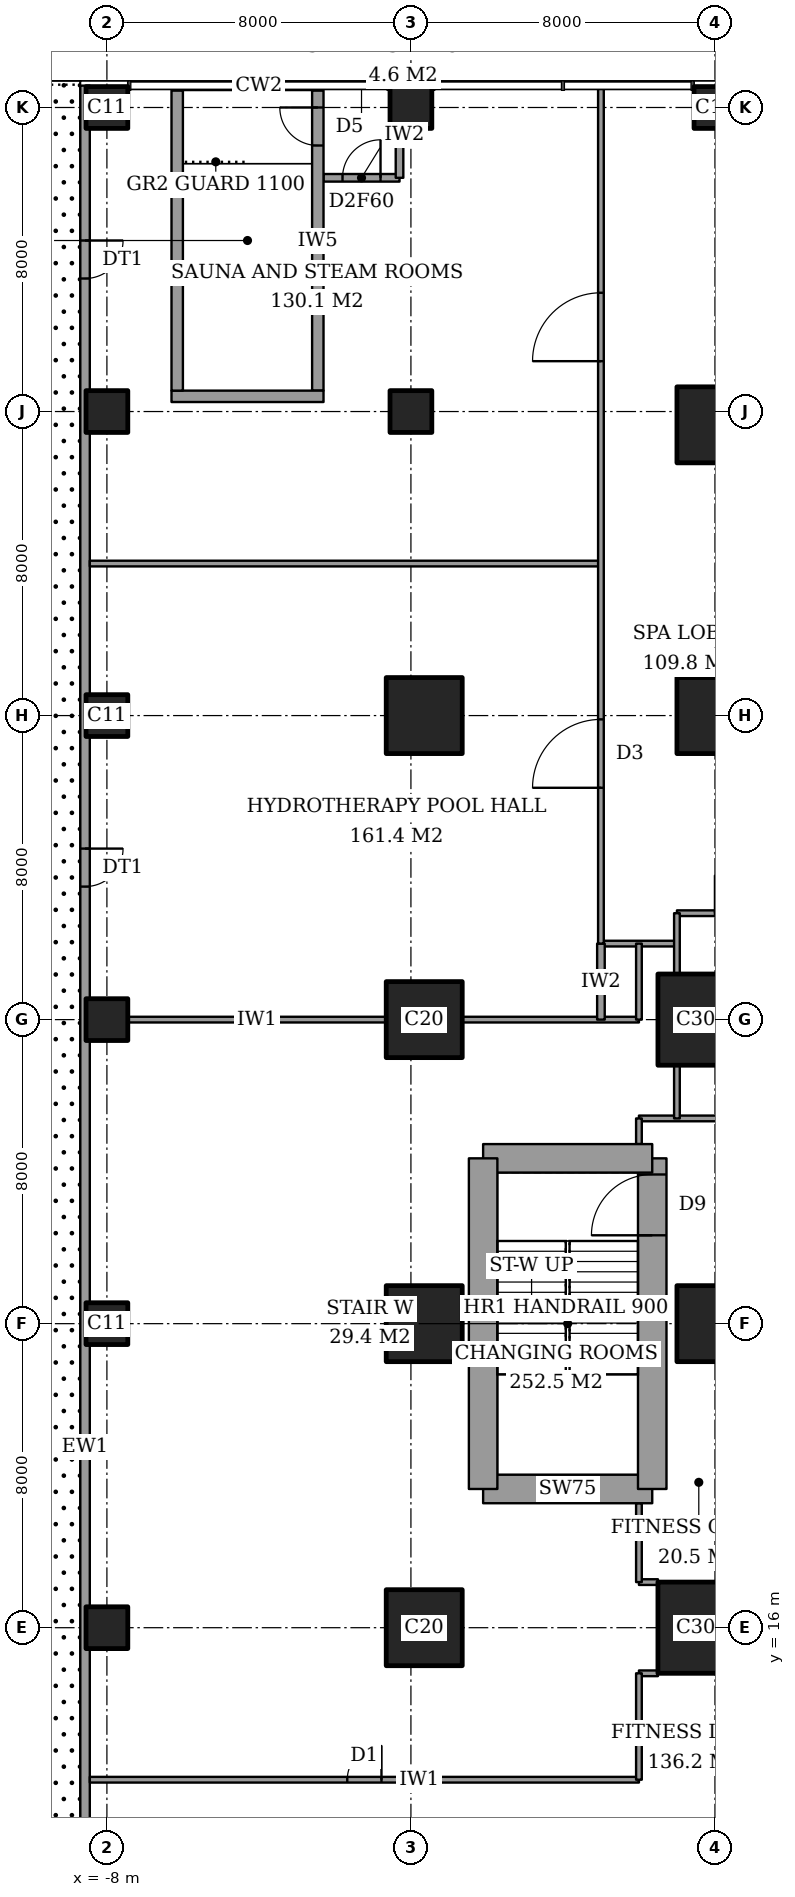
"""IFC4 building model, lengths in metres.
Left out: names, types, materials, properties, quantities, classifications, styles, units other than length and angle.
Written with IfcOpenShell. Run it as: python <this file> out.ifc"""

import sys

from ifc_helpers import new_model, si_unit, direction, frame, frame_2d, origin, origin_2d, place, context, subcontext, project, spatial, rectangle, extrude, element, fill, save


model = new_model("IFC4")
c1 = context("Model", 3, precision=1e-05, world=origin(), true_north=direction((0.0, 1.0)))
c2 = subcontext(c1, "Body", "Model", "MODEL_VIEW")
j1 = project(units=[si_unit("LENGTHUNIT", "METRE"), si_unit("PLANEANGLEUNIT", "RADIAN")], contexts=[c1])
p1 = place(None, origin())
s1 = spatial("IfcSite", under=j1, at=p1, CompositionType="ELEMENT")
p2 = place(p1, origin())
s2 = spatial("IfcBuilding", under=s1, at=p2, CompositionType="ELEMENT")
p3 = place(p2, frame((0.0, 0.0, 11.0)))
s3 = spatial("IfcBuildingStorey", under=s2, at=p3, CompositionType="ELEMENT", Elevation=11.0)
for number, where, z_axis, x_axis in (
    (1, (-8.0, 16.0, 0.0), (0.0, 0.0, 1.0), (1.0, 0.0, 0.0)),
    (2, (-8.0, 24.0, 0.0), (0.0, 0.0, 1.0), (1.0, 0.0, 0.0)),
    (3, (-8.0, 32.0, 0.0), (0.0, 0.0, 1.0), (1.0, 0.0, 0.0)),
    (4, (-8.0, 40.0, 0.0), (0.0, 0.0, 1.0), (1.0, 0.0, 0.0)),
    (5, (-8.0, 48.0, 0.0), (0.0, 0.0, 1.0), (1.0, 0.0, 0.0)),
    (6, (-8.0, 56.0, 0.0), (0.0, 0.0, 1.0), (1.0, 0.0, 0.0)),
):
    element("IfcColumn", number, at=place(p3, frame(where, z_axis=z_axis, x_axis=x_axis)), inside=s3, PredefinedType="COLUMN", context=c2, shape_type="SweptSolid", body=[
        extrude(rectangle(XDim=1.1, YDim=1.1, at=origin_2d()), origin(), (0.0, 0.0, 1.0), 5.0),
    ])
for number, where, z_axis, x_axis in (
    (7, (0.35, 16.0, 0.0), (0.0, 0.0, 1.0), (1.0, 0.0, 0.0)),
    (8, (0.35, 24.0, 0.0), (0.0, 0.0, 1.0), (1.0, 0.0, 0.0)),
    (9, (0.35, 32.0, 0.0), (0.0, 0.0, 1.0), (1.0, 0.0, 0.0)),
    (10, (0.35, 40.0, 0.0), (0.0, 0.0, 1.0), (1.0, 0.0, 0.0)),
):
    element("IfcColumn", number, at=place(p3, frame(where, z_axis=z_axis, x_axis=x_axis)), inside=s3, PredefinedType="COLUMN", context=c2, shape_type="SweptSolid", body=[
        extrude(rectangle(XDim=2.0, YDim=2.0, at=origin_2d()), origin(), (0.0, 0.0, 1.0), 5.0),
    ])
for number, where, z_axis, x_axis in (
    (11, (0.0, 48.0, 0.0), (0.0, 0.0, 1.0), (1.0, 0.0, 0.0)),
    (12, (0.0, 56.0, 0.0), (0.0, 0.0, 1.0), (1.0, 0.0, 0.0)),
):
    element("IfcColumn", number, at=place(p3, frame(where, z_axis=z_axis, x_axis=x_axis)), inside=s3, PredefinedType="COLUMN", context=c2, shape_type="SweptSolid", body=[
        extrude(rectangle(XDim=1.1, YDim=1.1, at=origin_2d()), origin(), (0.0, 0.0, 1.0), 5.0),
    ])
p4 = place(p3, frame((8.0, 16.0, 0.0), z_axis=(0.0, 0.0, 1.0), x_axis=(1.0, 0.0, 0.0)))
e13 = element("IfcColumn", 13, at=p4, inside=s3, PredefinedType="COLUMN", context=c2, shape_type="SweptSolid", body=[
    extrude(rectangle(XDim=3.0, YDim=2.4, at=origin_2d()), origin(), (0.0, 0.0, 1.0), 5.0),
])
p5 = place(p3, frame((8.0, 24.0, 0.0), z_axis=(0.0, 0.0, 1.0), x_axis=(1.0, 0.0, 0.0)))
e14 = element("IfcColumn", 14, at=p5, inside=s3, PredefinedType="COLUMN", context=c2, shape_type="SweptSolid", body=[
    extrude(rectangle(XDim=2.0, YDim=2.0, at=origin_2d()), origin(), (0.0, 0.0, 1.0), 5.0),
])
p6 = place(p3, frame((8.0, 32.0, 0.0), z_axis=(0.0, 0.0, 1.0), x_axis=(1.0, 0.0, 0.0)))
e15 = element("IfcColumn", 15, at=p6, inside=s3, PredefinedType="COLUMN", context=c2, shape_type="SweptSolid", body=[
    extrude(rectangle(XDim=3.0, YDim=2.4, at=origin_2d()), origin(), (0.0, 0.0, 1.0), 5.0),
])
for number, where, z_axis, x_axis in (
    (16, (8.0, 40.0, 0.0), (0.0, 0.0, 1.0), (1.0, 0.0, 0.0)),
    (17, (8.0, 47.65, 0.0), (0.0, 0.0, 1.0), (1.0, 0.0, 0.0)),
):
    element("IfcColumn", number, at=place(p3, frame(where, z_axis=z_axis, x_axis=x_axis)), inside=s3, PredefinedType="COLUMN", context=c2, shape_type="SweptSolid", body=[
        extrude(rectangle(XDim=2.0, YDim=2.0, at=origin_2d()), origin(), (0.0, 0.0, 1.0), 5.0),
    ])
p7 = place(p3, frame((8.0, 56.0, 0.0), z_axis=(0.0, 0.0, 1.0), x_axis=(1.0, 0.0, 0.0)))
e18 = element("IfcColumn", 18, at=p7, inside=s3, PredefinedType="COLUMN", context=c2, shape_type="SweptSolid", body=[
    extrude(rectangle(XDim=1.1, YDim=1.1, at=origin_2d()), origin(), (0.0, 0.0, 1.0), 5.0),
])
p8 = place(p3, frame((1.9, 19.65, 0.0), z_axis=(0.0, 0.0, 1.0), x_axis=(1.0, 0.0, 0.0)))
e19 = element("IfcWall", 19, at=p8, inside=s3, PredefinedType="SHEAR", context=c2, shape_type="SweptSolid", body=[
    extrude(rectangle(XDim=4.45, YDim=0.75, at=frame_2d((2.225, 0.0))), origin(), (0.0, 0.0, 1.0), 5.0),
])
p9 = place(p3, frame((6.35, 19.65, 0.0), z_axis=(0.0, 0.0, 1.0), x_axis=(0.0, 1.0, 0.0)))
e20 = element("IfcWall", 20, at=p9, inside=s3, PredefinedType="SHEAR", context=c2, shape_type="SweptSolid", body=[
    extrude(rectangle(XDim=8.7, YDim=0.75, at=frame_2d((4.35, 0.0))), origin(), (0.0, 0.0, 1.0), 5.0),
])
p10 = place(p9, frame((6.675, 0.0, 0.0)))
e21 = element("IfcOpeningElement", 21, at=p10, cuts=e20, PredefinedType="OPENING", context=c2, shape_type="SweptSolid", body=[
    extrude(rectangle(XDim=1.6, YDim=2.1, at=frame_2d((0.8, 1.05))), frame((0.0, 0.385, 0.0), z_axis=(0.0, -1.0, 0.0), x_axis=(1.0, 0.0, 0.0)), (0.0, 0.0, 1.0), 0.77),
])
p11 = place(p3, frame((6.35, 28.35, 0.0), z_axis=(0.0, 0.0, 1.0), x_axis=(-1.0, 0.0, 0.0)))
e22 = element("IfcWall", 22, at=p11, inside=s3, PredefinedType="SHEAR", context=c2, shape_type="SweptSolid", body=[
    extrude(rectangle(XDim=4.45, YDim=0.75, at=frame_2d((2.225, 0.0))), origin(), (0.0, 0.0, 1.0), 5.0),
])
p12 = place(p3, frame((1.9, 28.35, 0.0), z_axis=(0.0, 0.0, 1.0), x_axis=(0.0, -1.0, 0.0)))
e23 = element("IfcWall", 23, at=p12, inside=s3, PredefinedType="SHEAR", context=c2, shape_type="SweptSolid", body=[
    extrude(rectangle(XDim=8.7, YDim=0.75, at=frame_2d((4.35, 0.0))), origin(), (0.0, 0.0, 1.0), 5.0),
])
p13 = place(p3, frame((-8.575, 56.575, 0.0), z_axis=(0.0, 0.0, 1.0), x_axis=(0.0, -1.0, 0.0)))
e24 = element("IfcWall", 24, at=p13, inside=s3, PredefinedType="SOLIDWALL", context=c2, shape_type="SweptSolid", body=[
    extrude(rectangle(XDim=65.15, YDim=0.25, at=frame_2d((32.575, 0.0))), origin(), (0.0, 0.0, 1.0), 5.0),
])
p14 = place(p13, frame((4.075, 0.0, 0.0)))
e25 = element("IfcOpeningElement", 25, at=p14, cuts=e24, PredefinedType="OPENING", context=c2, shape_type="SweptSolid", body=[
    extrude(rectangle(XDim=1.0, YDim=2.4, at=frame_2d((0.5, 1.2))), frame((0.0, 0.135, 0.0), z_axis=(0.0, -1.0, 0.0), x_axis=(1.0, 0.0, 0.0)), (0.0, 0.0, 1.0), 0.27),
])
p15 = place(p13, frame((20.075, 0.0, 0.0)))
e26 = element("IfcOpeningElement", 26, at=p15, cuts=e24, PredefinedType="OPENING", context=c2, shape_type="SweptSolid", body=[
    extrude(rectangle(XDim=1.0, YDim=2.4, at=frame_2d((0.5, 1.2))), frame((0.0, 0.135, 0.0), z_axis=(0.0, -1.0, 0.0), x_axis=(1.0, 0.0, 0.0)), (0.0, 0.0, 1.0), 0.27),
])
p16 = place(p13, frame((52.075, 0.0, 0.0)))
e27 = element("IfcOpeningElement", 27, at=p16, cuts=e24, PredefinedType="OPENING", context=c2, shape_type="SweptSolid", body=[
    extrude(rectangle(XDim=1.0, YDim=2.4, at=frame_2d((0.5, 1.2))), frame((0.0, 0.135, 0.0), z_axis=(0.0, -1.0, 0.0), x_axis=(1.0, 0.0, 0.0)), (0.0, 0.0, 1.0), 0.27),
])
p17 = place(p3, frame((-8.45, 12.0, 0.0), z_axis=(0.0, 0.0, 1.0), x_axis=(1.0, 0.0, 0.0)))
e28 = element("IfcWall", 28, at=p17, inside=s3, PredefinedType="PARTITIONING", context=c2, shape_type="SweptSolid", body=[
    extrude(rectangle(XDim=14.45, YDim=0.15, at=frame_2d((7.225, 0.0))), origin(), (0.0, 0.0, 1.0), 4.7),
])
p18 = place(p17, frame((6.775, 0.0, 0.0)))
e29 = element("IfcOpeningElement", 29, at=p18, cuts=e28, PredefinedType="OPENING", context=c2, shape_type="SweptSolid", body=[
    extrude(rectangle(XDim=0.9, YDim=2.1, at=frame_2d((0.45, 1.05))), frame((0.0, 0.085, 0.0), z_axis=(0.0, -1.0, 0.0), x_axis=(1.0, 0.0, 0.0)), (0.0, 0.0, 1.0), 0.17),
])
for number, where, z_axis, x_axis in (
    (30, (6.0, 14.8, 0.0), (0.0, 0.0, 1.0), (1.0, 0.0, 0.0)),
    (31, (6.0, 17.2, 0.0), (0.0, 0.0, 1.0), (1.0, 0.0, 0.0)),
):
    element("IfcWall", number, at=place(p3, frame(where, z_axis=z_axis, x_axis=x_axis)), inside=s3, PredefinedType="PARTITIONING", context=c2, shape_type="SweptSolid", body=[
        extrude(rectangle(XDim=0.5, YDim=0.15, at=frame_2d((0.25, 0.0))), origin(), (0.0, 0.0, 1.0), 4.7),
    ])
p19 = place(p3, frame((6.0, 29.4, 0.0), z_axis=(0.0, 0.0, 1.0), x_axis=(1.0, 0.0, 0.0)))
e32 = element("IfcWall", 32, at=p19, inside=s3, PredefinedType="PARTITIONING", context=c2, shape_type="SweptSolid", body=[
    extrude(rectangle(XDim=12.9, YDim=0.15, at=frame_2d((6.45, 0.0))), origin(), (0.0, 0.0, 1.0), 4.7),
])
p20 = place(p19, frame((6.45, 0.0, 0.0)))
e33 = element("IfcOpeningElement", 33, at=p20, cuts=e32, PredefinedType="OPENING", context=c2, shape_type="SweptSolid", body=[
    extrude(rectangle(XDim=1.0, YDim=2.1, at=frame_2d((0.5, 1.05))), frame((0.0, 0.085, 0.0), z_axis=(0.0, -1.0, 0.0), x_axis=(1.0, 0.0, 0.0)), (0.0, 0.0, 1.0), 0.17),
])
p21 = place(p3, frame((-7.45, 32.0, 0.0), z_axis=(0.0, 0.0, 1.0), x_axis=(1.0, 0.0, 0.0)))
e34 = element("IfcWall", 34, at=p21, inside=s3, PredefinedType="PARTITIONING", context=c2, shape_type="SweptSolid", body=[
    extrude(rectangle(XDim=6.8, YDim=0.15, at=frame_2d((3.4, 0.0))), origin(), (0.0, 0.0, 1.0), 3.3),
])
p22 = place(p3, frame((1.35, 32.0, 0.0), z_axis=(0.0, 0.0, 1.0), x_axis=(1.0, 0.0, 0.0)))
e35 = element("IfcWall", 35, at=p22, inside=s3, PredefinedType="PARTITIONING", context=c2, shape_type="SweptSolid", body=[
    extrude(rectangle(XDim=4.65, YDim=0.15, at=frame_2d((2.325, 0.0))), origin(), (0.0, 0.0, 1.0), 3.3),
])
p23 = place(p3, frame((5.0, 34.0, 0.0), z_axis=(0.0, 0.0, 1.0), x_axis=(1.0, 0.0, 0.0)))
e36 = element("IfcWall", 36, at=p23, inside=s3, PredefinedType="PARTITIONING", context=c2, shape_type="SweptSolid", body=[
    extrude(rectangle(XDim=2.0, YDim=0.15, at=frame_2d((1.0, 0.0))), origin(), (0.0, 0.0, 1.0), 4.7),
])
p24 = place(p3, frame((7.0, 34.8, 0.0), z_axis=(0.0, 0.0, 1.0), x_axis=(1.0, 0.0, 0.0)))
e37 = element("IfcWall", 37, at=p24, inside=s3, PredefinedType="PARTITIONING", context=c2, shape_type="SweptSolid", body=[
    extrude(rectangle(XDim=11.9, YDim=0.15, at=frame_2d((5.95, 0.0))), origin(), (0.0, 0.0, 1.0), 4.7),
])
p25 = place(p24, frame((1.0, 0.0, 0.0)))
e38 = element("IfcOpeningElement", 38, at=p25, cuts=e37, PredefinedType="OPENING", context=c2, shape_type="SweptSolid", body=[
    extrude(rectangle(XDim=1.0, YDim=2.1, at=frame_2d((0.5, 1.05))), frame((0.0, 0.085, 0.0), z_axis=(0.0, -1.0, 0.0), x_axis=(1.0, 0.0, 0.0)), (0.0, 0.0, 1.0), 0.17),
])
p26 = place(p3, frame((-8.45, 44.0, 0.0), z_axis=(0.0, 0.0, 1.0), x_axis=(1.0, 0.0, 0.0)))
e39 = element("IfcWall", 39, at=p26, inside=s3, PredefinedType="PARTITIONING", context=c2, shape_type="SweptSolid", body=[
    extrude(rectangle(XDim=13.45, YDim=0.15, at=frame_2d((6.725, 0.0))), origin(), (0.0, 0.0, 1.0), 4.7),
])
p27 = place(p3, frame((-2.3, 54.15, 0.0), z_axis=(0.0, 0.0, 1.0), x_axis=(1.0, 0.0, 0.0)))
e40 = element("IfcWall", 40, at=p27, inside=s3, PredefinedType="PARTITIONING", context=c2, shape_type="SweptSolid", body=[
    extrude(rectangle(XDim=2.0, YDim=0.2, at=frame_2d((1.0, 0.0))), origin(), (0.0, 0.0, 1.0), 4.7),
])
p28 = place(p27, frame((0.5, 0.0, 0.0)))
e41 = element("IfcOpeningElement", 41, at=p28, cuts=e40, PredefinedType="OPENING", context=c2, shape_type="SweptSolid", body=[
    extrude(rectangle(XDim=1.0, YDim=2.1, at=frame_2d((0.5, 1.05))), frame((0.0, 0.11, 0.0), z_axis=(0.0, -1.0, 0.0), x_axis=(1.0, 0.0, 0.0)), (0.0, 0.0, 1.0), 0.22),
])
p29 = place(p3, frame((-0.3, 54.15, 0.0), z_axis=(0.0, 0.0, 1.0), x_axis=(0.0, 1.0, 0.0)))
e42 = element("IfcWall", 42, at=p29, inside=s3, PredefinedType="PARTITIONING", context=c2, shape_type="SweptSolid", body=[
    extrude(rectangle(XDim=1.3, YDim=0.2, at=frame_2d((0.65, 0.0))), origin(), (0.0, 0.0, 1.0), 3.3),
])
p30 = place(p3, frame((5.0, 32.0, 0.0), z_axis=(0.0, 0.0, 1.0), x_axis=(0.0, 1.0, 0.0)))
e43 = element("IfcWall", 43, at=p30, inside=s3, PredefinedType="PARTITIONING", context=c2, shape_type="SweptSolid", body=[
    extrude(rectangle(XDim=2.0, YDim=0.2, at=frame_2d((1.0, 0.0))), origin(), (0.0, 0.0, 1.0), 4.7),
])
p31 = place(p3, frame((5.0, 34.0, 0.0), z_axis=(0.0, 0.0, 1.0), x_axis=(0.0, 1.0, 0.0)))
e44 = element("IfcWall", 44, at=p31, inside=s3, PredefinedType="PARTITIONING", context=c2, shape_type="SweptSolid", body=[
    extrude(rectangle(XDim=22.561, YDim=0.15, at=frame_2d((11.281, 0.0))), origin(), (0.0, 0.0, 1.0), 4.7),
])
p32 = place(p31, frame((4.1, 0.0, 0.0)))
e45 = element("IfcOpeningElement", 45, at=p32, cuts=e44, PredefinedType="OPENING", context=c2, shape_type="SweptSolid", body=[
    extrude(rectangle(XDim=1.8, YDim=2.1, at=frame_2d((0.9, 1.05))), frame((0.0, 0.085, 0.0), z_axis=(0.0, -1.0, 0.0), x_axis=(1.0, 0.0, 0.0)), (0.0, 0.0, 1.0), 0.17),
])
p33 = place(p31, frame((15.325, 0.0, 0.0)))
e46 = element("IfcOpeningElement", 46, at=p33, cuts=e44, PredefinedType="OPENING", context=c2, shape_type="SweptSolid", body=[
    extrude(rectangle(XDim=1.8, YDim=2.1, at=frame_2d((0.9, 1.05))), frame((0.0, 0.085, 0.0), z_axis=(0.0, -1.0, 0.0), x_axis=(1.0, 0.0, 0.0)), (0.0, 0.0, 1.0), 0.17),
])
p34 = place(p3, frame((6.0, 12.0, 0.0), z_axis=(0.0, 0.0, 1.0), x_axis=(0.0, 1.0, 0.0)))
e47 = element("IfcWall", 47, at=p34, inside=s3, PredefinedType="PARTITIONING", context=c2, shape_type="SweptSolid", body=[
    extrude(rectangle(XDim=2.8, YDim=0.15, at=frame_2d((1.4, 0.0))), origin(), (0.0, 0.0, 1.0), 4.7),
])
p35 = place(p3, frame((6.0, 17.2, 0.0), z_axis=(0.0, 0.0, 1.0), x_axis=(0.0, 1.0, 0.0)))
e48 = element("IfcWall", 48, at=p35, inside=s3, PredefinedType="PARTITIONING", context=c2, shape_type="SweptSolid", body=[
    extrude(rectangle(XDim=2.075, YDim=0.15, at=frame_2d((1.038, 0.0))), origin(), (0.0, 0.0, 1.0), 4.7),
])
p36 = place(p3, frame((6.0, 28.725, 0.0), z_axis=(0.0, 0.0, 1.0), x_axis=(0.0, 1.0, 0.0)))
e49 = element("IfcWall", 49, at=p36, inside=s3, PredefinedType="PARTITIONING", context=c2, shape_type="SweptSolid", body=[
    extrude(rectangle(XDim=0.675, YDim=0.15, at=frame_2d((0.337, 0.0))), origin(), (0.0, 0.0, 1.0), 4.7),
])
p37 = place(p3, frame((6.0, 32.0, 0.0), z_axis=(0.0, 0.0, 1.0), x_axis=(0.0, 1.0, 0.0)))
e50 = element("IfcWall", 50, at=p37, inside=s3, PredefinedType="PARTITIONING", context=c2, shape_type="SweptSolid", body=[
    extrude(rectangle(XDim=2.0, YDim=0.15, at=frame_2d((1.0, 0.0))), origin(), (0.0, 0.0, 1.0), 4.7),
])
p38 = place(p3, frame((7.0, 29.4, 0.0), z_axis=(0.0, 0.0, 1.0), x_axis=(0.0, 1.0, 0.0)))
e51 = element("IfcWall", 51, at=p38, inside=s3, PredefinedType="PARTITIONING", context=c2, shape_type="SweptSolid", body=[
    extrude(rectangle(XDim=1.4, YDim=0.15, at=frame_2d((0.7, 0.0))), origin(), (0.0, 0.0, 1.0), 4.7),
])
p39 = place(p3, frame((7.0, 33.2, 0.0), z_axis=(0.0, 0.0, 1.0), x_axis=(0.0, 1.0, 0.0)))
e52 = element("IfcWall", 52, at=p39, inside=s3, PredefinedType="PARTITIONING", context=c2, shape_type="SweptSolid", body=[
    extrude(rectangle(XDim=1.6, YDim=0.15, at=frame_2d((0.8, 0.0))), origin(), (0.0, 0.0, 1.0), 4.7),
])
p40 = place(p3, frame((-6.3, 48.4, 0.0), z_axis=(0.0, 0.0, 1.0), x_axis=(1.0, 0.0, 0.0)))
e53 = element("IfcWall", 53, at=p40, inside=s3, PredefinedType="PARTITIONING", context=c2, shape_type="SweptSolid", body=[
    extrude(rectangle(XDim=4.0, YDim=0.3, at=frame_2d((2.0, 0.0))), origin(), (0.0, 0.0, 1.0), 4.7),
])
p41 = place(p3, frame((-6.15, 48.55, 0.0), z_axis=(0.0, 0.0, 1.0), x_axis=(0.0, 1.0, 0.0)))
e54 = element("IfcWall", 54, at=p41, inside=s3, PredefinedType="PARTITIONING", context=c2, shape_type="SweptSolid", body=[
    extrude(rectangle(XDim=7.9, YDim=0.3, at=frame_2d((3.95, 0.0))), origin(), (0.0, 0.0, 1.0), 4.7),
])
p42 = place(p3, frame((-2.45, 48.55, 0.0), z_axis=(0.0, 0.0, 1.0), x_axis=(0.0, 1.0, 0.0)))
e55 = element("IfcWall", 55, at=p42, inside=s3, PredefinedType="PARTITIONING", context=c2, shape_type="SweptSolid", body=[
    extrude(rectangle(XDim=7.9, YDim=0.3, at=frame_2d((3.95, 0.0))), origin(), (0.0, 0.0, 1.0), 4.7),
])
p43 = place(p42, frame((6.45, 0.0, 0.0)))
e56 = element("IfcOpeningElement", 56, at=p43, cuts=e55, PredefinedType="OPENING", context=c2, shape_type="SweptSolid", body=[
    extrude(rectangle(XDim=1.0, YDim=2.1, at=frame_2d((0.5, 1.05))), frame((0.0, 0.16, 0.0), z_axis=(0.0, -1.0, 0.0), x_axis=(1.0, 0.0, 0.0)), (0.0, 0.0, 1.0), 0.32),
])
for number, where, z_axis, x_axis in (
    (57, (-6.15, 56.45, 0.0), (0.0, 0.0, 1.0), (0.0, 1.0, 0.0)),
    (58, (-2.45, 56.45, 0.0), (0.0, 0.0, 1.0), (0.0, 1.0, 0.0)),
):
    element("IfcWall", number, at=place(p3, frame(where, z_axis=z_axis, x_axis=x_axis)), inside=s3, PredefinedType="PARTITIONING", context=c2, shape_type="SweptSolid", body=[
        extrude(rectangle(XDim=0.111, YDim=0.2, at=frame_2d((0.056, 0.0))), origin(), (0.0, 0.0, 1.0), 4.7),
    ])
p44 = place(p14, origin())
e59 = element("IfcDoor", 59, at=p44, inside=s3, OperationType="SINGLE_SWING_RIGHT", PredefinedType="DOOR", context=c2, shape_type="SweptSolid", body=[
    extrude(rectangle(XDim=1.0, YDim=2.4, at=frame_2d((0.5, 1.2))), frame((0.0, 0.025, 0.0), z_axis=(0.0, -1.0, 0.0), x_axis=(1.0, 0.0, 0.0)), (0.0, 0.0, 1.0), 0.05),
])
fill(e25, e59)
p45 = place(p15, origin())
e60 = element("IfcDoor", 60, at=p45, inside=s3, OperationType="SINGLE_SWING_RIGHT", PredefinedType="DOOR", context=c2, shape_type="SweptSolid", body=[
    extrude(rectangle(XDim=1.0, YDim=2.4, at=frame_2d((0.5, 1.2))), frame((0.0, 0.025, 0.0), z_axis=(0.0, -1.0, 0.0), x_axis=(1.0, 0.0, 0.0)), (0.0, 0.0, 1.0), 0.05),
])
fill(e26, e60)
p46 = place(p18, origin())
e61 = element("IfcDoor", 61, at=p46, inside=s3, OperationType="SINGLE_SWING_LEFT", PredefinedType="DOOR", context=c2, shape_type="SweptSolid", body=[
    extrude(rectangle(XDim=0.9, YDim=2.1, at=frame_2d((0.45, 1.05))), frame((0.0, 0.025, 0.0), z_axis=(0.0, -1.0, 0.0), x_axis=(1.0, 0.0, 0.0)), (0.0, 0.0, 1.0), 0.05),
])
fill(e29, e61)
p47 = place(p32, origin())
e62 = element("IfcDoor", 62, at=p47, inside=s3, OperationType="DOUBLE_DOOR_DOUBLE_SWING", PredefinedType="DOOR", context=c2, shape_type="SweptSolid", body=[
    extrude(rectangle(XDim=1.8, YDim=2.1, at=frame_2d((0.9, 1.05))), frame((0.0, 0.025, 0.0), z_axis=(0.0, -1.0, 0.0), x_axis=(1.0, 0.0, 0.0)), (0.0, 0.0, 1.0), 0.05),
])
fill(e45, e62)
p48 = place(p33, origin())
e63 = element("IfcDoor", 63, at=p48, inside=s3, OperationType="DOUBLE_DOOR_DOUBLE_SWING", PredefinedType="DOOR", context=c2, shape_type="SweptSolid", body=[
    extrude(rectangle(XDim=1.8, YDim=2.1, at=frame_2d((0.9, 1.05))), frame((0.0, 0.025, 0.0), z_axis=(0.0, -1.0, 0.0), x_axis=(1.0, 0.0, 0.0)), (0.0, 0.0, 1.0), 0.05),
])
fill(e46, e63)
p49 = place(p28, origin())
e64 = element("IfcDoor", 64, at=p49, inside=s3, OperationType="SINGLE_SWING_LEFT", PredefinedType="DOOR", context=c2, shape_type="SweptSolid", body=[
    extrude(rectangle(XDim=1.0, YDim=2.1, at=frame_2d((0.5, 1.05))), frame((0.0, 0.025, 0.0), z_axis=(0.0, -1.0, 0.0), x_axis=(1.0, 0.0, 0.0)), (0.0, 0.0, 1.0), 0.05),
])
fill(e41, e64)
p50 = place(p43, origin())
e65 = element("IfcDoor", 65, at=p50, inside=s3, OperationType="SINGLE_SWING_LEFT", PredefinedType="DOOR", context=c2, shape_type="SweptSolid", body=[
    extrude(rectangle(XDim=1.0, YDim=2.1, at=frame_2d((0.5, 1.05))), frame((0.0, 0.025, 0.0), z_axis=(0.0, -1.0, 0.0), x_axis=(1.0, 0.0, 0.0)), (0.0, 0.0, 1.0), 0.05),
])
fill(e56, e65)
p51 = place(p10, origin())
e66 = element("IfcDoor", 66, at=p51, inside=s3, OperationType="DOUBLE_DOOR_SINGLE_SWING", PredefinedType="DOOR", context=c2, shape_type="SweptSolid", body=[
    extrude(rectangle(XDim=1.6, YDim=2.1, at=frame_2d((0.8, 1.05))), frame((0.0, 0.025, 0.0), z_axis=(0.0, -1.0, 0.0), x_axis=(1.0, 0.0, 0.0)), (0.0, 0.0, 1.0), 0.05),
])
fill(e21, e66)
save(model, sys.argv[1])
